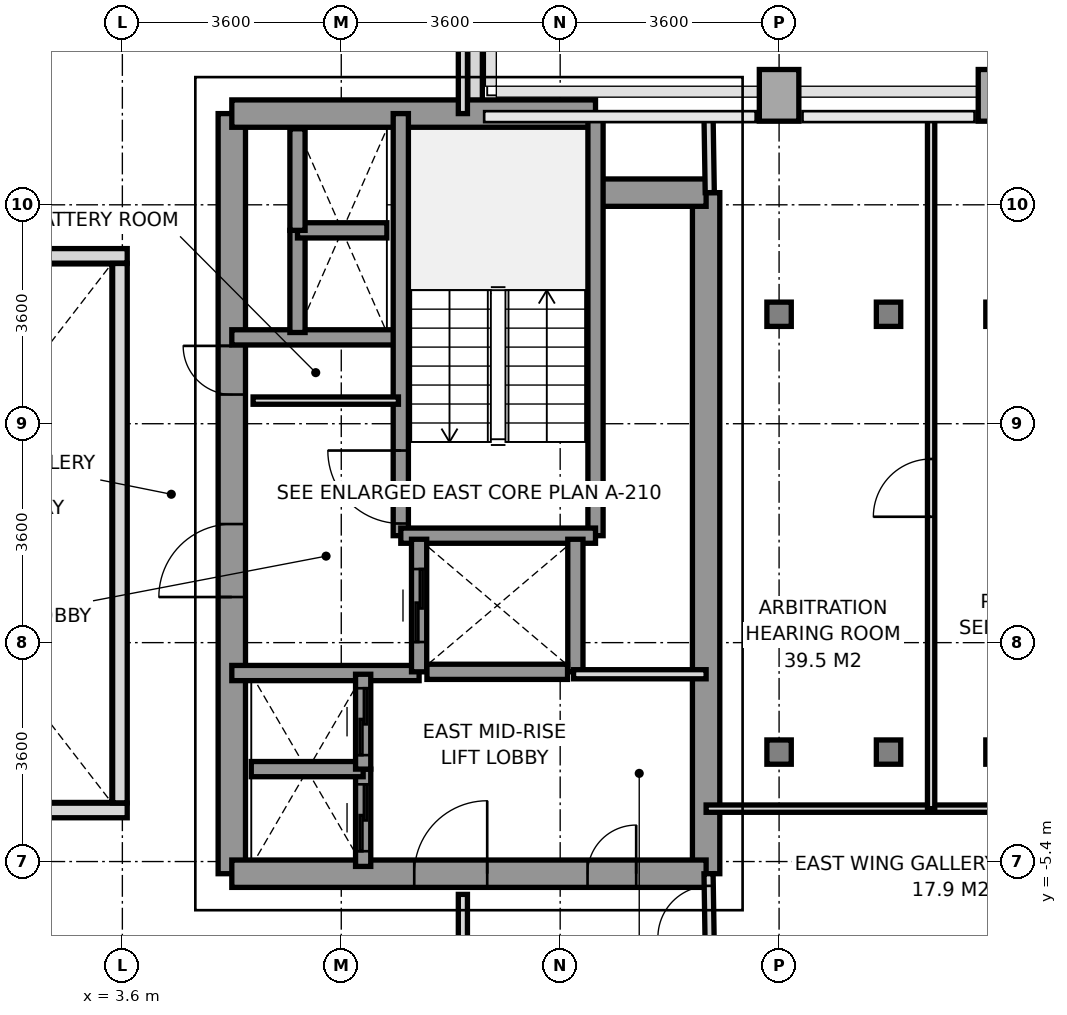
"""IFC4 building model, lengths in metres.
Left out: names, types, materials, properties, quantities, classifications, styles, units other than length and angle.
Written with IfcOpenShell. Run it as: python <this file> out.ifc"""

import sys

from ifc_helpers import new_model, si_unit, direction, frame, frame_2d, origin, origin_2d, place, context, subcontext, project, spatial, rectangle, i_section, extrude, source, transform, mapped, element, fill, save


model = new_model("IFC4")
c1 = context("Model", 3, precision=1e-05, world=origin(), true_north=direction((0.0, 1.0)))
c2 = subcontext(c1, "Body", "Model", "MODEL_VIEW")
j1 = project(units=[si_unit("LENGTHUNIT", "METRE"), si_unit("PLANEANGLEUNIT", "RADIAN")], contexts=[c1])
p1 = place(None, origin())
s1 = spatial("IfcSite", under=j1, at=p1, CompositionType="ELEMENT")
p2 = place(p1, origin())
s2 = spatial("IfcBuilding", under=s1, at=p2, CompositionType="ELEMENT")
p3 = place(p2, frame((0.0, 0.0, 131.2)))
s3 = spatial("IfcBuildingStorey", under=s2, at=p3, CompositionType="ELEMENT", Elevation=131.2)
m1 = source(origin(), c2, "Body", "SweptSolid", [
    extrude(i_section(OverallWidth=0.401, OverallDepth=0.399, WebThickness=0.02, FlangeThickness=0.032, at=origin_2d()), origin(), (0.0, 0.0, 1.0), 3.2),
])
for number, where, z_axis, x_axis in (
    (1, (14.4, -3.6, 0.0), (0.0, 0.0, 1.0), (1.0, 0.0, 0.0)),
    (2, (14.4, 3.6, 0.0), (0.0, 0.0, 1.0), (1.0, 0.0, 0.0)),
):
    element("IfcColumn", number, at=place(p3, frame(where, z_axis=z_axis, x_axis=x_axis)), inside=s3, PredefinedType="COLUMN", context=c2, shape_type="MappedRepresentation", body=[
        mapped(m1, transform((0.0, 0.0, 0.0), x_axis=(1.0, 0.0, 0.0), y_axis=(0.0, 1.0, 0.0), z_axis=(0.0, 0.0, 1.0), scale=1.0)),
    ])
m2 = source(origin(), c2, "Body", "SweptSolid", [
    extrude(rectangle(XDim=0.65, YDim=0.85, at=origin_2d()), origin(), (0.0, 0.0, 1.0), 3.2),
])
p4 = place(p3, frame((14.4, 7.2, 0.0), z_axis=(0.0, 0.0, 1.0), x_axis=(1.0, 0.0, 0.0)))
e3 = element("IfcColumn", 3, at=p4, inside=s3, PredefinedType="COLUMN", context=c2, shape_type="MappedRepresentation", body=[
    mapped(m2, transform((0.0, 0.0, 0.0), x_axis=(1.0, 0.0, 0.0), y_axis=(0.0, 1.0, 0.0), z_axis=(0.0, 0.0, 1.0), scale=1.0)),
])
for number, where, z_axis, x_axis in (
    (4, (16.2, -3.6, 0.0), (0.0, 0.0, 1.0), (1.0, 0.0, 0.0)),
    (5, (16.2, 3.6, 0.0), (0.0, 0.0, 1.0), (1.0, 0.0, 0.0)),
    (6, (18.0, -3.6, 0.0), (0.0, 0.0, 1.0), (1.0, 0.0, 0.0)),
    (7, (18.0, 3.6, 0.0), (0.0, 0.0, 1.0), (1.0, 0.0, 0.0)),
):
    element("IfcColumn", number, at=place(p3, frame(where, z_axis=z_axis, x_axis=x_axis)), inside=s3, PredefinedType="COLUMN", context=c2, shape_type="MappedRepresentation", body=[
        mapped(m1, transform((0.0, 0.0, 0.0), x_axis=(1.0, 0.0, 0.0), y_axis=(0.0, 1.0, 0.0), z_axis=(0.0, 0.0, 1.0), scale=1.0)),
    ])
p5 = place(p3, frame((18.0, 7.2, 0.0), z_axis=(0.0, 0.0, 1.0), x_axis=(1.0, 0.0, 0.0)))
e8 = element("IfcColumn", 8, at=p5, inside=s3, PredefinedType="COLUMN", context=c2, shape_type="MappedRepresentation", body=[
    mapped(m2, transform((0.0, 0.0, 0.0), x_axis=(1.0, 0.0, 0.0), y_axis=(0.0, 1.0, 0.0), z_axis=(0.0, 0.0, 1.0), scale=1.0)),
])
p6 = place(p3, frame((9.4, 8.472, 0.0), z_axis=(0.0, 0.0, 1.0), x_axis=(0.0, -1.0, 0.0)))
e9 = element("IfcWall", 9, at=p6, inside=s3, PredefinedType="PARAPET", context=c2, shape_type="SweptSolid", body=[
    extrude(rectangle(XDim=1.519, YDim=0.24, at=frame_2d((0.76, 0.0))), origin(), (0.0, 0.0, 1.0), 1.15),
])
p7 = place(p3, frame((13.2, -5.6, 0.0), z_axis=(0.0, 0.0, 1.0), x_axis=(0.0, 1.0, 0.0)))
e10 = element("IfcWall", 10, at=p7, inside=s3, PredefinedType="SHEAR", context=c2, shape_type="SweptSolid", body=[
    extrude(rectangle(XDim=11.2, YDim=0.45, at=frame_2d((5.6, 0.0))), origin(), (0.0, 0.0, 1.0), 3.2),
])
p8 = place(p3, frame((5.4, -5.6, 0.0), z_axis=(0.0, 0.0, 1.0), x_axis=(0.0, 1.0, 0.0)))
e11 = element("IfcWall", 11, at=p8, inside=s3, PredefinedType="SHEAR", context=c2, shape_type="SweptSolid", body=[
    extrude(rectangle(XDim=12.5, YDim=0.45, at=frame_2d((6.25, 0.0))), origin(), (0.0, 0.0, 1.0), 3.2),
])
p9 = place(p8, frame((4.55, 0.0, 0.0)))
e12 = element("IfcOpeningElement", 12, at=p9, cuts=e11, PredefinedType="OPENING", context=c2, shape_type="SweptSolid", body=[
    extrude(rectangle(XDim=1.2, YDim=2.2, at=frame_2d((0.6, 1.1))), frame((0.0, 0.235, 0.0), z_axis=(0.0, -1.0, 0.0), x_axis=(1.0, 0.0, 0.0)), (0.0, 0.0, 1.0), 0.47),
])
p10 = place(p8, frame((7.88, 0.0, 0.0)))
e13 = element("IfcOpeningElement", 13, at=p10, cuts=e11, PredefinedType="OPENING", context=c2, shape_type="SweptSolid", body=[
    extrude(rectangle(XDim=0.8, YDim=2.1, at=frame_2d((0.4, 1.05))), frame((0.0, 0.235, 0.0), z_axis=(0.0, -1.0, 0.0), x_axis=(1.0, 0.0, 0.0)), (0.0, 0.0, 1.0), 0.47),
])
p11 = place(p3, frame((5.4, 6.9, 0.0), z_axis=(0.0, 0.0, 1.0), x_axis=(1.0, 0.0, 0.0)))
e14 = element("IfcWall", 14, at=p11, inside=s3, PredefinedType="SHEAR", context=c2, shape_type="SweptSolid", body=[
    extrude(rectangle(XDim=5.981, YDim=0.45, at=frame_2d((2.991, 0.0))), origin(), (0.0, 0.0, 1.0), 3.2),
])
p12 = place(p3, frame((11.381, 5.6, 0.0), z_axis=(0.0, 0.0, 1.0), x_axis=(1.0, 0.0, 0.0)))
e15 = element("IfcWall", 15, at=p12, inside=s3, PredefinedType="SHEAR", context=c2, shape_type="SweptSolid", body=[
    extrude(rectangle(XDim=1.819, YDim=0.45, at=frame_2d((0.909, 0.0))), origin(), (0.0, 0.0, 1.0), 3.2),
])
p13 = place(p3, frame((5.4, -5.6, 0.0), z_axis=(0.0, 0.0, 1.0), x_axis=(1.0, 0.0, 0.0)))
e16 = element("IfcWall", 16, at=p13, inside=s3, PredefinedType="SHEAR", context=c2, shape_type="SweptSolid", body=[
    extrude(rectangle(XDim=7.8, YDim=0.45, at=frame_2d((3.9, 0.0))), origin(), (0.0, 0.0, 1.0), 3.2),
])
p14 = place(p13, frame((3.0, 0.0, 0.0)))
e17 = element("IfcOpeningElement", 17, at=p14, cuts=e16, PredefinedType="OPENING", context=c2, shape_type="SweptSolid", body=[
    extrude(rectangle(XDim=1.2, YDim=2.2, at=frame_2d((0.6, 1.1))), frame((0.0, 0.235, 0.0), z_axis=(0.0, -1.0, 0.0), x_axis=(1.0, 0.0, 0.0)), (0.0, 0.0, 1.0), 0.47),
])
p15 = place(p13, frame((5.85, 0.0, 0.0)))
e18 = element("IfcOpeningElement", 18, at=p15, cuts=e16, PredefinedType="OPENING", context=c2, shape_type="SweptSolid", body=[
    extrude(rectangle(XDim=0.8, YDim=2.1, at=frame_2d((0.4, 1.05))), frame((0.0, 0.235, 0.0), z_axis=(0.0, -1.0, 0.0), x_axis=(1.0, 0.0, 0.0)), (0.0, 0.0, 1.0), 0.47),
])
p16 = place(p3, frame((5.4, 3.22, 0.0), z_axis=(0.0, 0.0, 1.0), x_axis=(1.0, 0.0, 0.0)))
e19 = element("IfcWall", 19, at=p16, inside=s3, PredefinedType="SOLIDWALL", context=c2, shape_type="SweptSolid", body=[
    extrude(rectangle(XDim=2.78, YDim=0.25, at=frame_2d((1.39, 0.0))), origin(), (0.0, 0.0, 1.0), 3.2),
])
p17 = place(p3, frame((5.4, -2.3, 0.0), z_axis=(0.0, 0.0, 1.0), x_axis=(1.0, 0.0, 0.0)))
e20 = element("IfcWall", 20, at=p17, inside=s3, PredefinedType="SOLIDWALL", context=c2, shape_type="SweptSolid", body=[
    extrude(rectangle(XDim=3.08, YDim=0.25, at=frame_2d((1.54, 0.0))), origin(), (0.0, 0.0, 1.0), 3.2),
])
p18 = place(p3, frame((8.179, -0.041, 0.0), z_axis=(0.0, 0.0, 1.0), x_axis=(0.0, 1.0, 0.0)))
e21 = element("IfcWall", 21, at=p18, inside=s3, PredefinedType="SOLIDWALL", context=c2, shape_type="SweptSolid", body=[
    extrude(rectangle(XDim=6.941, YDim=0.25, at=frame_2d((3.47, 0.0))), origin(), (0.0, 0.0, 1.0), 3.2),
])
p19 = place(p18, frame((0.2, 0.0, 0.0)))
e22 = element("IfcOpeningElement", 22, at=p19, cuts=e21, PredefinedType="OPENING", context=c2, shape_type="SweptSolid", body=[
    extrude(rectangle(XDim=1.2, YDim=2.2, at=frame_2d((0.6, 1.1))), frame((0.0, 0.135, 0.0), z_axis=(0.0, -1.0, 0.0), x_axis=(1.0, 0.0, 0.0)), (0.0, 0.0, 1.0), 0.27),
])
p20 = place(p3, frame((11.381, -0.041, 0.0), z_axis=(0.0, 0.0, 1.0), x_axis=(0.0, 1.0, 0.0)))
e23 = element("IfcWall", 23, at=p20, inside=s3, PredefinedType="SOLIDWALL", context=c2, shape_type="SweptSolid", body=[
    extrude(rectangle(XDim=6.941, YDim=0.25, at=frame_2d((3.47, 0.0))), origin(), (0.0, 0.0, 1.0), 3.2),
])
p21 = place(p3, frame((8.179, -0.041, 0.0), z_axis=(0.0, 0.0, 1.0), x_axis=(1.0, 0.0, 0.0)))
e24 = element("IfcWall", 24, at=p21, inside=s3, PredefinedType="SOLIDWALL", context=c2, shape_type="SweptSolid", body=[
    extrude(rectangle(XDim=3.202, YDim=0.25, at=frame_2d((1.601, 0.0))), origin(), (0.0, 0.0, 1.0), 3.2),
])
p22 = place(p3, frame((8.48, -2.28, 0.0), z_axis=(0.0, 0.0, 1.0), x_axis=(0.0, 1.0, 0.0)))
e25 = element("IfcWall", 25, at=p22, inside=s3, PredefinedType="SOLIDWALL", context=c2, shape_type="SweptSolid", body=[
    extrude(rectangle(XDim=2.18, YDim=0.25, at=frame_2d((1.09, 0.0))), origin(), (0.0, 0.0, 1.0), 3.2),
])
p23 = place(p22, frame((0.49, 0.0, 0.0)))
e26 = element("IfcOpeningElement", 26, at=p23, cuts=e25, PredefinedType="OPENING", context=c2, shape_type="SweptSolid", body=[
    extrude(rectangle(XDim=1.2, YDim=2.2, at=frame_2d((0.6, 1.1))), frame((0.0, 0.135, 0.0), z_axis=(0.0, -1.0, 0.0), x_axis=(1.0, 0.0, 0.0)), (0.0, 0.0, 1.0), 0.27),
])
p24 = place(p3, frame((11.05, -2.28, 0.0), z_axis=(0.0, 0.0, 1.0), x_axis=(0.0, 1.0, 0.0)))
e27 = element("IfcWall", 27, at=p24, inside=s3, PredefinedType="SOLIDWALL", context=c2, shape_type="SweptSolid", body=[
    extrude(rectangle(XDim=2.18, YDim=0.25, at=frame_2d((1.09, 0.0))), origin(), (0.0, 0.0, 1.0), 3.2),
])
p25 = place(p3, frame((8.609, -2.28, 0.0), z_axis=(0.0, 0.0, 1.0), x_axis=(1.0, 0.0, 0.0)))
e28 = element("IfcWall", 28, at=p25, inside=s3, PredefinedType="SOLIDWALL", context=c2, shape_type="SweptSolid", body=[
    extrude(rectangle(XDim=2.312, YDim=0.25, at=frame_2d((1.156, 0.0))), origin(), (0.0, 0.0, 1.0), 3.2),
])
p26 = place(p3, frame((7.56, -5.48, 0.0), z_axis=(0.0, 0.0, 1.0), x_axis=(0.0, 1.0, 0.0)))
e29 = element("IfcWall", 29, at=p26, inside=s3, PredefinedType="SOLIDWALL", context=c2, shape_type="SweptSolid", body=[
    extrude(rectangle(XDim=1.6, YDim=0.25, at=frame_2d((0.8, 0.0))), origin(), (0.0, 0.0, 1.0), 3.2),
])
p27 = place(p26, frame((0.25, 0.0, 0.0)))
e30 = element("IfcOpeningElement", 30, at=p27, cuts=e29, PredefinedType="OPENING", context=c2, shape_type="SweptSolid", body=[
    extrude(rectangle(XDim=1.1, YDim=2.2, at=frame_2d((0.55, 1.1))), frame((0.0, 0.135, 0.0), z_axis=(0.0, -1.0, 0.0), x_axis=(1.0, 0.0, 0.0)), (0.0, 0.0, 1.0), 0.27),
])
p28 = place(p3, frame((5.72, -3.88, 0.0), z_axis=(0.0, 0.0, 1.0), x_axis=(1.0, 0.0, 0.0)))
e31 = element("IfcWall", 31, at=p28, inside=s3, PredefinedType="SOLIDWALL", context=c2, shape_type="SweptSolid", body=[
    extrude(rectangle(XDim=1.84, YDim=0.25, at=frame_2d((0.92, 0.0))), origin(), (0.0, 0.0, 1.0), 3.2),
])
p29 = place(p3, frame((7.56, -3.88, 0.0), z_axis=(0.0, 0.0, 1.0), x_axis=(0.0, 1.0, 0.0)))
e32 = element("IfcWall", 32, at=p29, inside=s3, PredefinedType="SOLIDWALL", context=c2, shape_type="SweptSolid", body=[
    extrude(rectangle(XDim=1.56, YDim=0.25, at=frame_2d((0.78, 0.0))), origin(), (0.0, 0.0, 1.0), 3.2),
])
p30 = place(p29, frame((0.23, 0.0, 0.0)))
e33 = element("IfcOpeningElement", 33, at=p30, cuts=e32, PredefinedType="OPENING", context=c2, shape_type="SweptSolid", body=[
    extrude(rectangle(XDim=1.1, YDim=2.2, at=frame_2d((0.55, 1.1))), frame((0.0, 0.135, 0.0), z_axis=(0.0, -1.0, 0.0), x_axis=(1.0, 0.0, 0.0)), (0.0, 0.0, 1.0), 0.27),
])
p31 = place(p3, frame((6.48, 3.3, 0.0), z_axis=(0.0, 0.0, 1.0), x_axis=(0.0, 1.0, 0.0)))
e34 = element("IfcWall", 34, at=p31, inside=s3, PredefinedType="SOLIDWALL", context=c2, shape_type="SweptSolid", body=[
    extrude(rectangle(XDim=1.68, YDim=0.25, at=frame_2d((0.84, 0.0))), origin(), (0.0, 0.0, 1.0), 3.2),
])
p32 = place(p3, frame((6.48, 4.98, 0.0), z_axis=(0.0, 0.0, 1.0), x_axis=(1.0, 0.0, 0.0)))
e35 = element("IfcWall", 35, at=p32, inside=s3, PredefinedType="SOLIDWALL", context=c2, shape_type="SweptSolid", body=[
    extrude(rectangle(XDim=1.47, YDim=0.25, at=frame_2d((0.735, 0.0))), origin(), (0.0, 0.0, 1.0), 3.2),
])
p33 = place(p3, frame((6.48, 4.98, 0.0), z_axis=(0.0, 0.0, 1.0), x_axis=(0.0, 1.0, 0.0)))
e36 = element("IfcWall", 36, at=p33, inside=s3, PredefinedType="SOLIDWALL", context=c2, shape_type="SweptSolid", body=[
    extrude(rectangle(XDim=1.67, YDim=0.25, at=frame_2d((0.835, 0.0))), origin(), (0.0, 0.0, 1.0), 3.2),
])
p34 = place(p3, frame((5.75, 2.18, 0.0), z_axis=(0.0, 0.0, 1.0), x_axis=(1.0, 0.0, 0.0)))
e37 = element("IfcWall", 37, at=p34, inside=s3, PredefinedType="PARTITIONING", context=c2, shape_type="SweptSolid", body=[
    extrude(rectangle(XDim=2.39, YDim=0.12, at=frame_2d((1.195, 0.0))), origin(), (0.0, 0.0, 1.0), 2.3),
])
p35 = place(p3, frame((11.02, -2.32, 0.0), z_axis=(0.0, 0.0, 1.0), x_axis=(1.0, 0.0, 0.0)))
e38 = element("IfcWall", 38, at=p35, inside=s3, PredefinedType="PARTITIONING", context=c2, shape_type="SweptSolid", body=[
    extrude(rectangle(XDim=2.18, YDim=0.15, at=frame_2d((1.09, 0.0))), origin(), (0.0, 0.0, 1.0), 3.2),
])
p36 = place(p3, frame((9.2, 6.9, 0.0), z_axis=(0.0, 0.0, 1.0), x_axis=(0.0, 1.0, 0.0)))
e39 = element("IfcWall", 39, at=p36, inside=s3, PredefinedType="PARTITIONING", context=c2, shape_type="SweptSolid", body=[
    extrude(rectangle(XDim=8.78, YDim=0.15, at=frame_2d((4.39, 0.0))), origin(), (0.0, 0.0, 1.0), 2.7),
])
p37 = place(p3, frame((9.2, -15.68, 0.0), z_axis=(0.0, 0.0, 1.0), x_axis=(0.0, 1.0, 0.0)))
e40 = element("IfcWall", 40, at=p37, inside=s3, PredefinedType="PARTITIONING", context=c2, shape_type="SweptSolid", body=[
    extrude(rectangle(XDim=9.74, YDim=0.15, at=frame_2d((4.87, 0.0))), origin(), (0.0, 0.0, 1.0), 2.7),
])
p38 = place(p3, frame((13.26, 5.6, 0.0), z_axis=(0.0, 0.0, 1.0), x_axis=(-0.016013571389, 0.999871774545, 0.0)))
e41 = element("IfcWall", 41, at=p38, inside=s3, PredefinedType="PARTITIONING", context=c2, shape_type="SweptSolid", body=[
    extrude(rectangle(XDim=1.25, YDim=0.15, at=frame_2d((0.625, 0.0))), origin(), (0.0, 0.0, 1.0), 3.2),
])
p39 = place(p3, frame((13.26, -6.85, 0.0), z_axis=(0.0, 0.0, 1.0), x_axis=(-0.016013571389, 0.999871774545, 0.0)))
e42 = element("IfcWall", 42, at=p39, inside=s3, PredefinedType="PARTITIONING", context=c2, shape_type="SweptSolid", body=[
    extrude(rectangle(XDim=1.25, YDim=0.15, at=frame_2d((0.625, 0.0))), origin(), (0.0, 0.0, 1.0), 3.2),
])
p40 = place(p39, frame((0.2, 0.0, 0.0)))
e43 = element("IfcOpeningElement", 43, at=p40, cuts=e42, PredefinedType="OPENING", context=c2, shape_type="SweptSolid", body=[
    extrude(rectangle(XDim=0.85, YDim=2.1, at=frame_2d((0.425, 1.05))), frame((0.0, 0.085, 0.0), z_axis=(0.0, -1.0, 0.0), x_axis=(1.0, 0.0, 0.0)), (0.0, 0.0, 1.0), 0.17),
])
p41 = place(p3, frame((13.2, -4.53, 0.0), z_axis=(0.0, 0.0, 1.0), x_axis=(1.0, 0.0, 0.0)))
e44 = element("IfcWall", 44, at=p41, inside=s3, PredefinedType="PARTITIONING", context=c2, shape_type="SweptSolid", body=[
    extrude(rectangle(XDim=10.1, YDim=0.12, at=frame_2d((5.05, 0.0))), origin(), (0.0, 0.0, 1.0), 2.76),
])
p42 = place(p41, frame((7.75, 0.0, 0.0)))
e45 = element("IfcOpeningElement", 45, at=p42, cuts=e44, PredefinedType="OPENING", context=c2, shape_type="SweptSolid", body=[
    extrude(rectangle(XDim=0.95, YDim=2.15, at=frame_2d((0.475, 1.075))), frame((0.0, 0.07, 0.0), z_axis=(0.0, -1.0, 0.0), x_axis=(1.0, 0.0, 0.0)), (0.0, 0.0, 1.0), 0.14),
])
p43 = place(p3, frame((16.9, -4.53, 0.0), z_axis=(0.0, 0.0, 1.0), x_axis=(0.0, 1.0, 0.0)))
e46 = element("IfcWall", 46, at=p43, inside=s3, PredefinedType="PARTITIONING", context=c2, shape_type="SweptSolid", body=[
    extrude(rectangle(XDim=11.38, YDim=0.12, at=frame_2d((5.69, 0.0))), origin(), (0.0, 0.0, 1.0), 2.7),
])
p44 = place(p43, frame((4.8, 0.0, 0.0)))
e47 = element("IfcOpeningElement", 47, at=p44, cuts=e46, PredefinedType="OPENING", context=c2, shape_type="SweptSolid", body=[
    extrude(rectangle(XDim=0.95, YDim=2.15, at=frame_2d((0.475, 1.075))), frame((0.0, 0.07, 0.0), z_axis=(0.0, -1.0, 0.0), x_axis=(1.0, 0.0, 0.0)), (0.0, 0.0, 1.0), 0.14),
])
for number, where, z_axis, x_axis in (
    (48, (-3.68, -4.56, 0.0), (0.0, 0.0, 1.0), (1.0, 0.0, 0.0)),
    (49, (-3.68, 4.56, 0.0), (0.0, 0.0, 1.0), (1.0, 0.0, 0.0)),
):
    element("IfcWall", number, at=place(p3, frame(where, z_axis=z_axis, x_axis=x_axis)), inside=s3, PredefinedType="PARAPET", context=c2, shape_type="SweptSolid", body=[
        extrude(rectangle(XDim=7.36, YDim=0.24, at=frame_2d((3.68, 0.0))), origin(), (0.0, 0.0, 1.0), 1.15),
    ])
p45 = place(p3, frame((3.56, -4.435, 0.0), z_axis=(0.0, 0.0, 1.0), x_axis=(0.0, 1.0, 0.0)))
e50 = element("IfcWall", 50, at=p45, inside=s3, PredefinedType="PARAPET", context=c2, shape_type="SweptSolid", body=[
    extrude(rectangle(XDim=8.87, YDim=0.24, at=frame_2d((4.435, 0.0))), origin(), (0.0, 0.0, 1.0), 1.15),
])
m3 = source(origin(), c2, "Body", "SweptSolid", [
    extrude(rectangle(XDim=1.2, YDim=2.2, at=frame_2d((0.6, 1.1))), frame((0.0, 0.025, 0.0), z_axis=(0.0, -1.0, 0.0), x_axis=(1.0, 0.0, 0.0)), (0.0, 0.0, 1.0), 0.05),
])
p46 = place(p19, origin())
e51 = element("IfcDoor", 51, at=p46, inside=s3, OperationType="SINGLE_SWING_RIGHT", PredefinedType="DOOR", context=c2, shape_type="MappedRepresentation", body=[
    mapped(m3, transform((0.0, 0.0, 0.0), x_axis=(1.0, 0.0, 0.0), y_axis=(0.0, 1.0, 0.0), z_axis=(0.0, 0.0, 1.0), scale=1.0)),
])
fill(e22, e51)
p47 = place(p9, origin())
e52 = element("IfcDoor", 52, at=p47, inside=s3, OperationType="SINGLE_SWING_LEFT", PredefinedType="DOOR", context=c2, shape_type="MappedRepresentation", body=[
    mapped(m3, transform((0.0, 0.0, 0.0), x_axis=(1.0, 0.0, 0.0), y_axis=(0.0, 1.0, 0.0), z_axis=(0.0, 0.0, 1.0), scale=1.0)),
])
fill(e12, e52)
p48 = place(p14, origin())
e53 = element("IfcDoor", 53, at=p48, inside=s3, OperationType="SINGLE_SWING_RIGHT", PredefinedType="DOOR", context=c2, shape_type="MappedRepresentation", body=[
    mapped(m3, transform((0.0, 0.0, 0.0), x_axis=(1.0, 0.0, 0.0), y_axis=(0.0, 1.0, 0.0), z_axis=(0.0, 0.0, 1.0), scale=1.0)),
])
fill(e17, e53)
m4 = source(origin(), c2, "Body", "SweptSolid", [
    extrude(rectangle(XDim=0.8, YDim=2.1, at=frame_2d((0.4, 1.05))), frame((0.0, 0.025, 0.0), z_axis=(0.0, -1.0, 0.0), x_axis=(1.0, 0.0, 0.0)), (0.0, 0.0, 1.0), 0.05),
])
p49 = place(p10, origin())
e54 = element("IfcDoor", 54, at=p49, inside=s3, OperationType="SINGLE_SWING_RIGHT", PredefinedType="DOOR", context=c2, shape_type="MappedRepresentation", body=[
    mapped(m4, transform((0.0, 0.0, 0.0), x_axis=(1.0, 0.0, 0.0), y_axis=(0.0, 1.0, 0.0), z_axis=(0.0, 0.0, 1.0), scale=1.0)),
])
fill(e13, e54)
p50 = place(p15, origin())
e55 = element("IfcDoor", 55, at=p50, inside=s3, OperationType="SINGLE_SWING_RIGHT", PredefinedType="DOOR", context=c2, shape_type="MappedRepresentation", body=[
    mapped(m4, transform((0.0, 0.0, 0.0), x_axis=(1.0, 0.0, 0.0), y_axis=(0.0, 1.0, 0.0), z_axis=(0.0, 0.0, 1.0), scale=1.0)),
])
fill(e18, e55)
p51 = place(p23, origin())
e56 = element("IfcDoor", 56, at=p51, inside=s3, OperationType="SLIDING_TO_RIGHT", PredefinedType="DOOR", context=c2, shape_type="MappedRepresentation", body=[
    mapped(m3, transform((0.0, 0.0, 0.0), x_axis=(1.0, 0.0, 0.0), y_axis=(0.0, 1.0, 0.0), z_axis=(0.0, 0.0, 1.0), scale=1.0)),
])
fill(e26, e56)
m5 = source(origin(), c2, "Body", "SweptSolid", [
    extrude(rectangle(XDim=1.1, YDim=2.2, at=frame_2d((0.55, 1.1))), frame((0.0, 0.025, 0.0), z_axis=(0.0, -1.0, 0.0), x_axis=(1.0, 0.0, 0.0)), (0.0, 0.0, 1.0), 0.05),
])
p52 = place(p27, origin())
e57 = element("IfcDoor", 57, at=p52, inside=s3, OperationType="SLIDING_TO_LEFT", PredefinedType="DOOR", context=c2, shape_type="MappedRepresentation", body=[
    mapped(m5, transform((0.0, 0.0, 0.0), x_axis=(1.0, 0.0, 0.0), y_axis=(0.0, 1.0, 0.0), z_axis=(0.0, 0.0, 1.0), scale=1.0)),
])
fill(e30, e57)
p53 = place(p30, origin())
e58 = element("IfcDoor", 58, at=p53, inside=s3, OperationType="SLIDING_TO_LEFT", PredefinedType="DOOR", context=c2, shape_type="MappedRepresentation", body=[
    mapped(m5, transform((0.0, 0.0, 0.0), x_axis=(1.0, 0.0, 0.0), y_axis=(0.0, 1.0, 0.0), z_axis=(0.0, 0.0, 1.0), scale=1.0)),
])
fill(e33, e58)
m6 = source(origin(), c2, "Body", "SweptSolid", [
    extrude(rectangle(XDim=0.85, YDim=2.1, at=frame_2d((0.425, 1.05))), frame((0.0, 0.025, 0.0), z_axis=(0.0, -1.0, 0.0), x_axis=(1.0, 0.0, 0.0)), (0.0, 0.0, 1.0), 0.05),
])
p54 = place(p40, origin())
e59 = element("IfcDoor", 59, at=p54, inside=s3, OperationType="SINGLE_SWING_LEFT", PredefinedType="DOOR", context=c2, shape_type="MappedRepresentation", body=[
    mapped(m6, transform((0.0, 0.0, 0.0), x_axis=(1.0, 0.0, 0.0), y_axis=(0.0, 1.0, 0.0), z_axis=(0.0, 0.0, 1.0), scale=1.0)),
])
fill(e43, e59)
m7 = source(origin(), c2, "Body", "SweptSolid", [
    extrude(rectangle(XDim=0.95, YDim=2.15, at=frame_2d((0.475, 1.075))), frame((0.0, 0.025, 0.0), z_axis=(0.0, -1.0, 0.0), x_axis=(1.0, 0.0, 0.0)), (0.0, 0.0, 1.0), 0.05),
])
p55 = place(p44, origin())
e60 = element("IfcDoor", 60, at=p55, inside=s3, OperationType="SINGLE_SWING_LEFT", PredefinedType="DOOR", context=c2, shape_type="MappedRepresentation", body=[
    mapped(m7, transform((0.0, 0.0, 0.0), x_axis=(1.0, 0.0, 0.0), y_axis=(0.0, 1.0, 0.0), z_axis=(0.0, 0.0, 1.0), scale=1.0)),
])
fill(e47, e60)
save(model, sys.argv[1])
